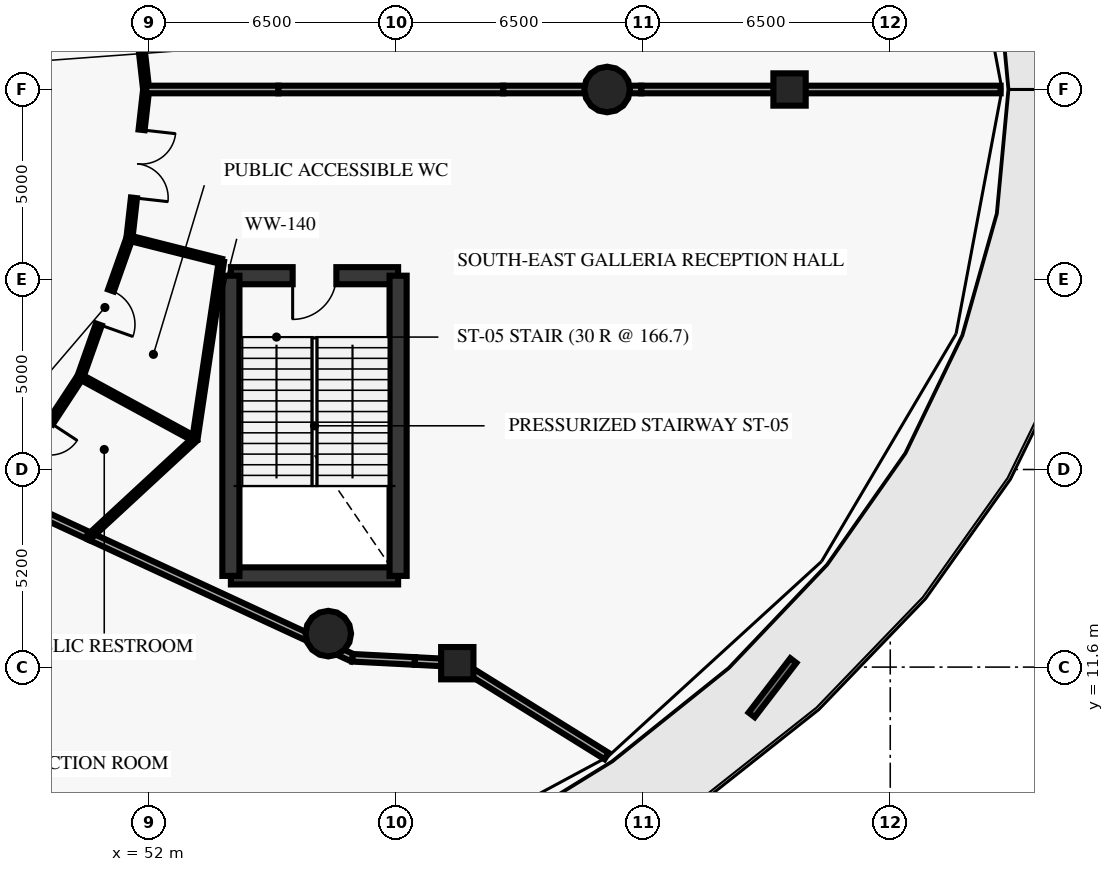
"""IFC4 building model, lengths in metres.
Left out: names, types, materials, properties, quantities, classifications, styles, units other than length and angle.
Written with IfcOpenShell. Run it as: python <this file> out.ifc"""

import sys

from ifc_helpers import new_model, si_unit, direction, frame, frame_2d, origin, origin_2d, place, context, subcontext, project, spatial, rectangle, circle, extrude, element, fill, save


model = new_model("IFC4")
c1 = context("Model", 3, precision=1e-05, world=origin(), true_north=direction((0.0, 1.0)))
c2 = subcontext(c1, "Body", "Model", "MODEL_VIEW")
j1 = project(units=[si_unit("LENGTHUNIT", "METRE"), si_unit("PLANEANGLEUNIT", "RADIAN")], contexts=[c1])
p1 = place(None, origin())
s1 = spatial("IfcSite", under=j1, at=p1, CompositionType="ELEMENT")
p2 = place(p1, origin())
s2 = spatial("IfcBuilding", under=s1, at=p2, CompositionType="ELEMENT")
p3 = place(p2, frame((0.0, 0.0, 11.0)))
s3 = spatial("IfcBuildingStorey", under=s2, at=p3, CompositionType="ELEMENT", Elevation=11.0)
for number, where, z_axis, x_axis in (
    (1, (64.05, 26.8, 0.0), (0.0, 0.0, 1.0), (1.0, 0.0, 0.0)),
    (2, (56.713, 12.481, 0.0), (0.0, 0.0, 1.0), (1.0, 0.0, 0.0)),
):
    element("IfcColumn", number, at=place(p3, frame(where, z_axis=z_axis, x_axis=x_axis)), inside=s3, PredefinedType="COLUMN", context=c2, shape_type="SweptSolid", body=[
        extrude(circle(Radius=0.6, at=origin_2d()), origin(), (0.0, 0.0, 1.0), 4.7),
    ])
for number, where, z_axis, x_axis in (
    (3, (68.85, 26.8, 0.0), (0.0, 0.0, 1.0), (1.0, 0.0, 0.0)),
    (4, (60.107, 11.703, 0.0), (0.0, 0.0, 1.0), (1.0, 0.0, 0.0)),
):
    element("IfcColumn", number, at=place(p3, frame(where, z_axis=z_axis, x_axis=x_axis)), inside=s3, PredefinedType="COLUMN", context=c2, shape_type="SweptSolid", body=[
        extrude(rectangle(XDim=0.85, YDim=0.85, at=origin_2d()), origin(), (0.0, 0.0, 1.0), 4.7),
    ])
p4 = place(p3, frame((68.95, 11.771, 0.0), z_axis=(0.0, 0.0, 1.0), x_axis=(-0.608838635348, -0.793294091814, 0.0)))
e5 = element("IfcWall", 5, at=p4, inside=s3, PredefinedType="ELEMENTEDWALL", context=c2, shape_type="SweptSolid", body=[
    extrude(rectangle(XDim=1.8, YDim=0.2, at=frame_2d((0.9, 0.0))), origin(), (0.0, 0.0, 1.0), 0.65),
])
p5 = place(p3, frame((54.15, 14.0, 0.0), z_axis=(0.0, 0.0, 1.0), x_axis=(1.0, 0.0, 0.0)))
e6 = element("IfcWall", 6, at=p5, inside=s3, PredefinedType="SHEAR", context=c2, shape_type="SweptSolid", body=[
    extrude(rectangle(XDim=4.4, YDim=0.45, at=frame_2d((2.2, 0.0))), origin(), (0.0, 0.0, 1.0), 4.7),
])
p6 = place(p3, frame((58.55, 21.9, 0.0), z_axis=(0.0, 0.0, 1.0), x_axis=(-1.0, 0.0, 0.0)))
e7 = element("IfcWall", 7, at=p6, inside=s3, PredefinedType="SHEAR", context=c2, shape_type="SweptSolid", body=[
    extrude(rectangle(XDim=4.4, YDim=0.45, at=frame_2d((2.2, 0.0))), origin(), (0.0, 0.0, 1.0), 4.7),
])
p7 = place(p6, frame((1.625, 0.0, 0.0)))
e8 = element("IfcOpeningElement", 8, at=p7, cuts=e7, PredefinedType="OPENING", context=c2, shape_type="SweptSolid", body=[
    extrude(rectangle(XDim=1.15, YDim=2.15, at=frame_2d((0.575, 1.075))), frame((0.0, 0.235, 0.0), z_axis=(0.0, -1.0, 0.0), x_axis=(1.0, 0.0, 0.0)), (0.0, 0.0, 1.0), 0.47),
])
for number, where, z_axis, x_axis in (
    (9, (54.15, 14.0, 0.0), (0.0, 0.0, 1.0), (0.0, 1.0, 0.0)),
    (10, (58.55, 14.0, 0.0), (0.0, 0.0, 1.0), (0.0, 1.0, 0.0)),
):
    element("IfcWall", number, at=place(p3, frame(where, z_axis=z_axis, x_axis=x_axis)), inside=s3, PredefinedType="SHEAR", context=c2, shape_type="SweptSolid", body=[
        extrude(rectangle(XDim=7.9, YDim=0.45, at=frame_2d((3.95, 0.0))), origin(), (0.0, 0.0, 1.0), 4.7),
    ])
p8 = place(p3, frame((51.92, 26.8, 0.0), z_axis=(0.0, 0.0, 1.0), x_axis=(-0.111731247657, 0.993738460711, 0.0)))
e11 = element("IfcWall", 11, at=p8, inside=s3, PredefinedType="PARTITIONING", context=c2, shape_type="SweptSolid", body=[
    extrude(rectangle(XDim=3.938, YDim=0.16, at=frame_2d((1.969, 0.0))), origin(), (0.0, 0.0, 1.0), 4.7),
])
p9 = place(p3, frame((50.189, 19.24, 0.0), z_axis=(0.0, 0.0, 1.0), x_axis=(-0.548318837904, -0.836269365694, 0.0)))
e12 = element("IfcWall", 12, at=p9, inside=s3, PredefinedType="PARTITIONING", context=c2, shape_type="SweptSolid", body=[
    extrude(rectangle(XDim=3.744, YDim=0.16, at=frame_2d((1.872, 0.0))), origin(), (0.0, 0.0, 1.0), 4.7),
])
p10 = place(p9, frame((1.447, 0.0, 0.0)))
e13 = element("IfcOpeningElement", 13, at=p10, cuts=e12, PredefinedType="OPENING", context=c2, shape_type="SweptSolid", body=[
    extrude(rectangle(XDim=0.85, YDim=2.1, at=frame_2d((0.425, 1.05))), frame((0.0, 0.09, 0.0), z_axis=(0.0, -1.0, 0.0), x_axis=(1.0, 0.0, 0.0)), (0.0, 0.0, 1.0), 0.18),
])
p11 = place(p3, frame((51.48, 22.887, 0.0), z_axis=(0.0, 0.0, 1.0), x_axis=(-0.333704620558, -0.942677689467, 0.0)))
e14 = element("IfcWall", 14, at=p11, inside=s3, PredefinedType="PARTITIONING", context=c2, shape_type="SweptSolid", body=[
    extrude(rectangle(XDim=3.869, YDim=0.16, at=frame_2d((1.934, 0.0))), origin(), (0.0, 0.0, 1.0), 4.7),
])
p12 = place(p11, frame((1.459, 0.0, 0.0)))
e15 = element("IfcOpeningElement", 15, at=p12, cuts=e14, PredefinedType="OPENING", context=c2, shape_type="SweptSolid", body=[
    extrude(rectangle(XDim=0.95, YDim=2.1, at=frame_2d((0.475, 1.05))), frame((0.0, 0.09, 0.0), z_axis=(0.0, -1.0, 0.0), x_axis=(1.0, 0.0, 0.0)), (0.0, 0.0, 1.0), 0.18),
])
p13 = place(p3, frame((51.92, 26.8, 0.0), z_axis=(0.0, 0.0, 1.0), x_axis=(-0.111724363671, -0.99373923469, 0.0)))
e16 = element("IfcWall", 16, at=p13, inside=s3, PredefinedType="PARTITIONING", context=c2, shape_type="SweptSolid", body=[
    extrude(rectangle(XDim=3.938, YDim=0.16, at=frame_2d((1.969, 0.0))), origin(), (0.0, 0.0, 1.0), 4.7),
])
p14 = place(p13, frame((1.069, 0.0, 0.0)))
e17 = element("IfcOpeningElement", 17, at=p14, cuts=e16, PredefinedType="OPENING", context=c2, shape_type="SweptSolid", body=[
    extrude(rectangle(XDim=1.8, YDim=2.3, at=frame_2d((0.9, 1.15))), frame((0.0, 0.09, 0.0), z_axis=(0.0, -1.0, 0.0), x_axis=(1.0, 0.0, 0.0)), (0.0, 0.0, 1.0), 0.18),
])
p15 = place(p3, frame((51.92, 26.8, 0.0), z_axis=(0.0, 0.0, 1.0), x_axis=(1.0, 0.0, 0.0)))
e18 = element("IfcWall", 18, at=p15, inside=s3, PredefinedType="PARTITIONING", context=c2, shape_type="SweptSolid", body=[
    extrude(rectangle(XDim=3.48, YDim=0.2, at=frame_2d((1.74, 0.0))), origin(), (0.0, 0.0, 1.0), 4.7),
])
p16 = place(p3, frame((55.4, 26.8, 0.0), z_axis=(0.0, 0.0, 1.0), x_axis=(1.0, 0.0, 0.0)))
e19 = element("IfcWall", 19, at=p16, inside=s3, PredefinedType="PARTITIONING", context=c2, shape_type="SweptSolid", body=[
    extrude(rectangle(XDim=5.917, YDim=0.2, at=frame_2d((2.958, 0.0))), origin(), (0.0, 0.0, 1.0), 4.7),
])
p17 = place(p3, frame((61.317, 26.8, 0.0), z_axis=(0.0, 0.0, 1.0), x_axis=(1.0, 0.0, 0.0)))
e20 = element("IfcWall", 20, at=p17, inside=s3, PredefinedType="PARTITIONING", context=c2, shape_type="SweptSolid", body=[
    extrude(rectangle(XDim=3.633, YDim=0.2, at=frame_2d((1.816, 0.0))), origin(), (0.0, 0.0, 1.0), 3.66),
])
p18 = place(p3, frame((64.95, 26.8, 0.0), z_axis=(0.0, 0.0, 1.0), x_axis=(1.0, 0.0, 0.0)))
e21 = element("IfcWall", 21, at=p18, inside=s3, PredefinedType="PARTITIONING", context=c2, shape_type="SweptSolid", body=[
    extrude(rectangle(XDim=3.9, YDim=0.2, at=frame_2d((1.95, 0.0))), origin(), (0.0, 0.0, 1.0), 4.24),
])
p19 = place(p3, frame((68.85, 26.8, 0.0), z_axis=(0.0, 0.0, 1.0), x_axis=(1.0, 0.0, 0.0)))
e22 = element("IfcWall", 22, at=p19, inside=s3, PredefinedType="PARTITIONING", context=c2, shape_type="SweptSolid", body=[
    extrude(rectangle(XDim=5.555, YDim=0.2, at=frame_2d((2.777, 0.0))), origin(), (0.0, 0.0, 1.0), 4.7),
])
p20 = place(p3, frame((48.136, 16.109, 0.0), z_axis=(0.0, 0.0, 1.0), x_axis=(0.907508335547, -0.420034071133, 0.0)))
e23 = element("IfcWall", 23, at=p20, inside=s3, PredefinedType="PARTITIONING", context=c2, shape_type="SweptSolid", body=[
    extrude(rectangle(XDim=2.538, YDim=0.2, at=frame_2d((1.269, 0.0))), origin(), (0.0, 0.0, 1.0), 4.7),
])
p21 = place(p3, frame((50.439, 15.043, 0.0), z_axis=(0.0, 0.0, 1.0), x_axis=(0.907524397356, -0.419999366908, 0.0)))
e24 = element("IfcWall", 24, at=p21, inside=s3, PredefinedType="PARTITIONING", context=c2, shape_type="SweptSolid", body=[
    extrude(rectangle(XDim=7.614, YDim=0.2, at=frame_2d((3.807, 0.0))), origin(), (0.0, 0.0, 1.0), 4.7),
])
p22 = place(p3, frame((57.349, 11.845, 0.0), z_axis=(0.0, 0.0, 1.0), x_axis=(0.998692725363, -0.051115949639, 0.0)))
e25 = element("IfcWall", 25, at=p22, inside=s3, PredefinedType="PARTITIONING", context=c2, shape_type="SweptSolid", body=[
    extrude(rectangle(XDim=1.643, YDim=0.2, at=frame_2d((0.822, 0.0))), origin(), (0.0, 0.0, 1.0), 4.7),
])
p23 = place(p3, frame((58.99, 11.761, 0.0), z_axis=(0.0, 0.0, 1.0), x_axis=(0.998649603439, -0.051951607785, 0.0)))
e26 = element("IfcWall", 26, at=p23, inside=s3, PredefinedType="PARTITIONING", context=c2, shape_type="SweptSolid", body=[
    extrude(rectangle(XDim=1.118, YDim=0.2, at=frame_2d((0.559, 0.0))), origin(), (0.0, 0.0, 1.0), 4.24),
])
p24 = place(p3, frame((60.107, 11.703, 0.0), z_axis=(0.0, 0.0, 1.0), x_axis=(0.849173378653, -0.528114166623, 0.0)))
e27 = element("IfcWall", 27, at=p24, inside=s3, PredefinedType="PARTITIONING", context=c2, shape_type="SweptSolid", body=[
    extrude(rectangle(XDim=4.626, YDim=0.2, at=frame_2d((2.313, 0.0))), origin(), (0.0, 0.0, 1.0), 4.7),
])
p25 = place(p3, frame((50.189, 19.24, 0.0), z_axis=(0.0, 0.0, 1.0), x_axis=(0.878392721738, -0.477939563541, 0.0)))
e28 = element("IfcWall", 28, at=p25, inside=s3, PredefinedType="PARTITIONING", context=c2, shape_type="SweptSolid", body=[
    extrude(rectangle(XDim=3.431, YDim=0.14, at=frame_2d((1.716, 0.0))), origin(), (0.0, 0.0, 1.0), 4.7),
])
p26 = place(p3, frame((51.48, 22.887, 0.0), z_axis=(0.0, 0.0, 1.0), x_axis=(0.969564374521, -0.244836524357, 0.0)))
e29 = element("IfcWall", 29, at=p26, inside=s3, PredefinedType="PARTITIONING", context=c2, shape_type="SweptSolid", body=[
    extrude(rectangle(XDim=2.496, YDim=0.14, at=frame_2d((1.248, 0.0))), origin(), (0.0, 0.0, 1.0), 4.7),
])
p27 = place(p3, frame((50.439, 15.043, 0.0), z_axis=(0.0, 0.0, 1.0), x_axis=(0.734032370371, 0.679114481695, 0.0)))
e30 = element("IfcWall", 30, at=p27, inside=s3, PredefinedType="PARTITIONING", context=c2, shape_type="SweptSolid", body=[
    extrude(rectangle(XDim=3.765, YDim=0.14, at=frame_2d((1.883, 0.0))), origin(), (0.0, 0.0, 1.0), 4.7),
])
p28 = place(p3, frame((53.203, 17.6, 0.0), z_axis=(0.0, 0.0, 1.0), x_axis=(0.147441370436, 0.989070797407, 0.0)))
e31 = element("IfcWall", 31, at=p28, inside=s3, PredefinedType="PARTITIONING", context=c2, shape_type="SweptSolid", body=[
    extrude(rectangle(XDim=4.728, YDim=0.14, at=frame_2d((2.364, 0.0))), origin(), (0.0, 0.0, 1.0), 4.7),
])
p29 = place(p7, origin())
e32 = element("IfcDoor", 32, at=p29, inside=s3, OperationType="SINGLE_SWING_RIGHT", PredefinedType="DOOR", context=c2, shape_type="SweptSolid", body=[
    extrude(rectangle(XDim=1.15, YDim=2.15, at=frame_2d((0.575, 1.075))), frame((0.0, 0.025, 0.0), z_axis=(0.0, -1.0, 0.0), x_axis=(1.0, 0.0, 0.0)), (0.0, 0.0, 1.0), 0.05),
])
fill(e8, e32)
p30 = place(p12, origin())
e33 = element("IfcDoor", 33, at=p30, inside=s3, OperationType="SINGLE_SWING_RIGHT", PredefinedType="DOOR", context=c2, shape_type="SweptSolid", body=[
    extrude(rectangle(XDim=0.95, YDim=2.1, at=frame_2d((0.475, 1.05))), frame((0.0, 0.025, 0.0), z_axis=(0.0, -1.0, 0.0), x_axis=(1.0, 0.0, 0.0)), (0.0, 0.0, 1.0), 0.05),
])
fill(e15, e33)
p31 = place(p14, origin())
e34 = element("IfcDoor", 34, at=p31, inside=s3, OperationType="DOUBLE_DOOR_SINGLE_SWING", PredefinedType="DOOR", context=c2, shape_type="SweptSolid", body=[
    extrude(rectangle(XDim=1.8, YDim=2.3, at=frame_2d((0.9, 1.15))), frame((0.0, 0.025, 0.0), z_axis=(0.0, -1.0, 0.0), x_axis=(1.0, 0.0, 0.0)), (0.0, 0.0, 1.0), 0.05),
])
fill(e17, e34)
save(model, sys.argv[1])
